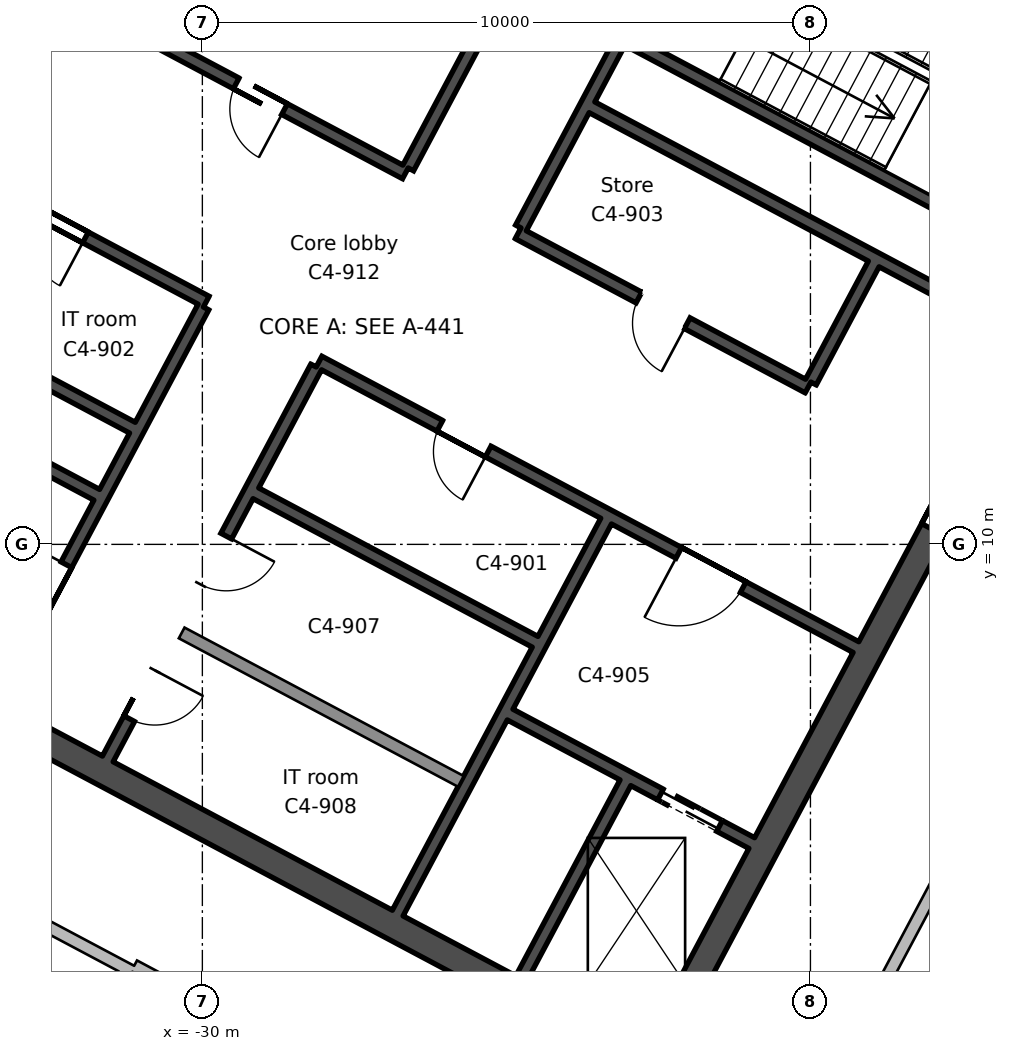
"""IFC4 building model, lengths in metres.
Left out: names, types, materials, properties, quantities, classifications, styles, units other than length and angle.
Written with IfcOpenShell. Run it as: python <this file> out.ifc"""

import sys

from ifc_helpers import new_model, si_unit, direction, frame, frame_2d, origin, place, context, subcontext, project, spatial, rectangle, extrude, element, fill, save


model = new_model("IFC4")
c1 = context("Model", 3, precision=1e-05, world=origin(), true_north=direction((0.0, 1.0)))
c2 = subcontext(c1, "Body", "Model", "MODEL_VIEW")
j1 = project(units=[si_unit("LENGTHUNIT", "METRE"), si_unit("PLANEANGLEUNIT", "RADIAN")], contexts=[c1])
p1 = place(None, origin())
s1 = spatial("IfcSite", under=j1, at=p1, CompositionType="ELEMENT")
p2 = place(p1, origin())
s2 = spatial("IfcBuilding", under=s1, at=p2, CompositionType="ELEMENT")
p3 = place(p2, frame((0.0, 0.0, 340.8)))
s3 = spatial("IfcBuildingStorey", under=s2, at=p3, CompositionType="ELEMENT", Elevation=340.8)
p4 = place(p3, frame((-13.771, 18.138, 0.0), z_axis=(0.0, 0.0, 1.0), x_axis=(-0.469467968382, -0.882949504028, 0.0)))
e1 = element("IfcWall", 1, at=p4, inside=s3, PredefinedType="SHEAR", context=c2, shape_type="SweptSolid", body=[
    extrude(rectangle(XDim=19.1, YDim=0.45, at=frame_2d((9.55, 0.0))), origin(), (0.0, 0.0, 1.0), 4.2),
])
p5 = place(p4, frame((6.55, 0.0, 0.0)))
e2 = element("IfcOpeningElement", 2, at=p5, cuts=e1, PredefinedType="OPENING", context=c2, shape_type="SweptSolid", body=[
    extrude(rectangle(XDim=2.4, YDim=2.4, at=frame_2d((1.2, 1.2))), frame((0.0, 0.235, 0.0), z_axis=(0.0, -1.0, 0.0), x_axis=(1.0, 0.0, 0.0)), (0.0, 0.0, 1.0), 0.47),
])
p6 = place(p3, frame((-32.004, 27.833, 0.0), z_axis=(0.0, 0.0, 1.0), x_axis=(-0.469467968382, -0.882949504028, 0.0)))
e3 = element("IfcWall", 3, at=p6, inside=s3, PredefinedType="SHEAR", context=c2, shape_type="SweptSolid", body=[
    extrude(rectangle(XDim=19.1, YDim=0.45, at=frame_2d((9.55, 0.0))), origin(), (0.0, 0.0, 1.0), 4.2),
])
p7 = place(p6, frame((10.15, 0.0, 0.0)))
e4 = element("IfcOpeningElement", 4, at=p7, cuts=e3, PredefinedType="OPENING", context=c2, shape_type="SweptSolid", body=[
    extrude(rectangle(XDim=2.4, YDim=2.4, at=frame_2d((1.2, 1.2))), frame((0.0, 0.235, 0.0), z_axis=(0.0, -1.0, 0.0), x_axis=(1.0, 0.0, 0.0)), (0.0, 0.0, 1.0), 0.47),
])
p8 = place(p3, frame((-14.076, 18.045, 0.0), z_axis=(0.0, 0.0, 1.0), x_axis=(-0.882947755831, 0.46947125628, 0.0)))
e5 = element("IfcWall", 5, at=p8, inside=s3, PredefinedType="SHEAR", context=c2, shape_type="SweptSolid", body=[
    extrude(rectangle(XDim=20.2, YDim=0.45, at=frame_2d((10.1, 0.0))), origin(), (0.0, 0.0, 1.0), 4.2),
])
p9 = place(p3, frame((-22.832, 1.578, 0.0), z_axis=(0.0, 0.0, 1.0), x_axis=(-0.88294509198, 0.469476266226, 0.0)))
e6 = element("IfcWall", 6, at=p9, inside=s3, PredefinedType="SHEAR", context=c2, shape_type="SweptSolid", body=[
    extrude(rectangle(XDim=20.2, YDim=0.45, at=frame_2d((10.1, 0.0))), origin(), (0.0, 0.0, 1.0), 4.2),
])
p10 = place(p3, frame((-23.043, 6.08, 0.0), z_axis=(0.0, 0.0, 1.0), x_axis=(-0.469494272526, -0.882935517501, 0.0)))
e7 = element("IfcWall", 7, at=p10, inside=s3, PredefinedType="SHEAR", context=c2, shape_type="SweptSolid", body=[
    extrude(rectangle(XDim=3.65, YDim=0.2, at=frame_2d((1.825, 0.0))), origin(), (0.0, 0.0, 1.0), 4.2),
])
p11 = place(p3, frame((-18.96, 14.611, 0.0), z_axis=(0.0, 0.0, 1.0), x_axis=(-0.4694473164, -0.882960484464, 0.0)))
e8 = element("IfcWall", 8, at=p11, inside=s3, PredefinedType="SHEAR", context=c2, shape_type="SweptSolid", body=[
    extrude(rectangle(XDim=2.2, YDim=0.2, at=frame_2d((1.1, 0.0))), origin(), (0.0, 0.0, 1.0), 4.2),
])
p12 = place(p3, frame((-23.36, 10.382, 0.0), z_axis=(0.0, 0.0, 1.0), x_axis=(-0.469480409012, -0.88294288918, 0.0)))
e9 = element("IfcWall", 9, at=p12, inside=s3, PredefinedType="SHEAR", context=c2, shape_type="SweptSolid", body=[
    extrude(rectangle(XDim=7.3, YDim=0.2, at=frame_2d((3.65, 0.0))), origin(), (0.0, 0.0, 1.0), 4.2),
])
p13 = place(p3, frame((-21.333, 21.649, 0.0), z_axis=(0.0, 0.0, 1.0), x_axis=(-0.469494272526, -0.882935517501, 0.0)))
e10 = element("IfcWall", 10, at=p13, inside=s3, PredefinedType="SHEAR", context=c2, shape_type="SweptSolid", body=[
    extrude(rectangle(XDim=7.3, YDim=0.2, at=frame_2d((3.65, 0.0))), origin(), (0.0, 0.0, 1.0), 4.2),
])
p14 = place(p13, frame((1.3, 0.0, 0.0)))
e11 = element("IfcOpeningElement", 11, at=p14, cuts=e10, PredefinedType="OPENING", context=c2, shape_type="SweptSolid", body=[
    extrude(rectangle(XDim=1.2, YDim=2.1, at=frame_2d((0.6, 1.05))), frame((0.0, 0.11, 0.0), z_axis=(0.0, -1.0, 0.0), x_axis=(1.0, 0.0, 0.0)), (0.0, 0.0, 1.0), 0.22),
])
p15 = place(p3, frame((-28.128, 12.917, 0.0), z_axis=(0.0, 0.0, 1.0), x_axis=(-0.469454336211, -0.882956752176, 0.0)))
e12 = element("IfcWall", 12, at=p15, inside=s3, PredefinedType="SHEAR", context=c2, shape_type="SweptSolid", body=[
    extrude(rectangle(XDim=7.3, YDim=0.2, at=frame_2d((3.65, 0.0))), origin(), (0.0, 0.0, 1.0), 4.2),
])
p16 = place(p15, frame((3.15, 0.0, 0.0)))
e13 = element("IfcOpeningElement", 13, at=p16, cuts=e12, PredefinedType="OPENING", context=c2, shape_type="SweptSolid", body=[
    extrude(rectangle(XDim=0.9, YDim=2.1, at=frame_2d((0.45, 1.05))), frame((0.0, 0.11, 0.0), z_axis=(0.0, -1.0, 0.0), x_axis=(1.0, 0.0, 0.0)), (0.0, 0.0, 1.0), 0.22),
])
p17 = place(p15, frame((5.65, 0.0, 0.0)))
e14 = element("IfcOpeningElement", 14, at=p17, cuts=e12, PredefinedType="OPENING", context=c2, shape_type="SweptSolid", body=[
    extrude(rectangle(XDim=0.9, YDim=2.1, at=frame_2d((0.45, 1.05))), frame((0.0, 0.11, 0.0), z_axis=(0.0, -1.0, 0.0), x_axis=(1.0, 0.0, 0.0)), (0.0, 0.0, 1.0), 0.22),
])
p18 = place(p3, frame((-23.188, 22.635, 0.0), z_axis=(0.0, 0.0, 1.0), x_axis=(-0.469454336211, -0.882956752176, 0.0)))
e15 = element("IfcWall", 15, at=p18, inside=s3, PredefinedType="SHEAR", context=c2, shape_type="SweptSolid", body=[
    extrude(rectangle(XDim=7.3, YDim=0.2, at=frame_2d((3.65, 0.0))), origin(), (0.0, 0.0, 1.0), 4.2),
])
p19 = place(p18, frame((0.45, 0.0, 0.0)))
e16 = element("IfcOpeningElement", 16, at=p19, cuts=e15, PredefinedType="OPENING", context=c2, shape_type="SweptSolid", body=[
    extrude(rectangle(XDim=0.9, YDim=2.1, at=frame_2d((0.45, 1.05))), frame((0.0, 0.11, 0.0), z_axis=(0.0, -1.0, 0.0), x_axis=(1.0, 0.0, 0.0)), (0.0, 0.0, 1.0), 0.22),
])
p20 = place(p18, frame((2.15, 0.0, 0.0)))
e17 = element("IfcOpeningElement", 17, at=p20, cuts=e15, PredefinedType="OPENING", context=c2, shape_type="SweptSolid", body=[
    extrude(rectangle(XDim=0.9, YDim=2.1, at=frame_2d((0.45, 1.05))), frame((0.0, 0.11, 0.0), z_axis=(0.0, -1.0, 0.0), x_axis=(1.0, 0.0, 0.0)), (0.0, 0.0, 1.0), 0.22),
])
p21 = place(p18, frame((3.75, 0.0, 0.0)))
e18 = element("IfcOpeningElement", 18, at=p21, cuts=e15, PredefinedType="OPENING", context=c2, shape_type="SweptSolid", body=[
    extrude(rectangle(XDim=0.9, YDim=2.1, at=frame_2d((0.45, 1.05))), frame((0.0, 0.11, 0.0), z_axis=(0.0, -1.0, 0.0), x_axis=(1.0, 0.0, 0.0)), (0.0, 0.0, 1.0), 0.22),
])
p22 = place(p3, frame((-29.982, 13.903, 0.0), z_axis=(0.0, 0.0, 1.0), x_axis=(-0.469454336211, -0.882956752176, 0.0)))
e19 = element("IfcWall", 19, at=p22, inside=s3, PredefinedType="SHEAR", context=c2, shape_type="SweptSolid", body=[
    extrude(rectangle(XDim=7.3, YDim=0.2, at=frame_2d((3.65, 0.0))), origin(), (0.0, 0.0, 1.0), 4.2),
])
p23 = place(p22, frame((4.8, 0.0, 0.0)))
e20 = element("IfcOpeningElement", 20, at=p23, cuts=e19, PredefinedType="OPENING", context=c2, shape_type="SweptSolid", body=[
    extrude(rectangle(XDim=1.2, YDim=2.1, at=frame_2d((0.6, 1.05))), frame((0.0, 0.11, 0.0), z_axis=(0.0, -1.0, 0.0), x_axis=(1.0, 0.0, 0.0)), (0.0, 0.0, 1.0), 0.22),
])
p24 = place(p3, frame((-15.942, 14.536, 0.0), z_axis=(0.0, 0.0, 1.0), x_axis=(-0.882946947542, 0.469472776449, 0.0)))
e21 = element("IfcWall", 21, at=p24, inside=s3, PredefinedType="SHEAR", context=c2, shape_type="SweptSolid", body=[
    extrude(rectangle(XDim=8.0, YDim=0.2, at=frame_2d((4.0, 0.0))), origin(), (0.0, 0.0, 1.0), 4.2),
])
p25 = place(p3, frame((-16.529, 13.432, 0.0), z_axis=(0.0, 0.0, 1.0), x_axis=(-0.88295287151, 0.469461634952, 0.0)))
e22 = element("IfcWall", 22, at=p25, inside=s3, PredefinedType="SHEAR", context=c2, shape_type="SweptSolid", body=[
    extrude(rectangle(XDim=8.0, YDim=0.2, at=frame_2d((4.0, 0.0))), origin(), (0.0, 0.0, 1.0), 4.2),
])
p26 = place(p3, frame((-20.04, 12.581, 0.0), z_axis=(0.0, 0.0, 1.0), x_axis=(-0.882942972946, 0.469480251476, 0.0)))
e23 = element("IfcWall", 23, at=p26, inside=s3, PredefinedType="SHEAR", context=c2, shape_type="SweptSolid", body=[
    extrude(rectangle(XDim=5.4, YDim=0.2, at=frame_2d((2.7, 0.0))), origin(), (0.0, 0.0, 1.0), 4.2),
])
p27 = place(p26, frame((2.25, 0.0, 0.0)))
e24 = element("IfcOpeningElement", 24, at=p27, cuts=e23, PredefinedType="OPENING", context=c2, shape_type="SweptSolid", body=[
    extrude(rectangle(XDim=0.9, YDim=2.1, at=frame_2d((0.45, 1.05))), frame((0.0, 0.11, 0.0), z_axis=(0.0, -1.0, 0.0), x_axis=(1.0, 0.0, 0.0)), (0.0, 0.0, 1.0), 0.22),
])
p28 = place(p3, frame((-26.662, 16.102, 0.0), z_axis=(0.0, 0.0, 1.0), x_axis=(-0.882940221191, 0.469485426614, 0.0)))
e25 = element("IfcWall", 25, at=p28, inside=s3, PredefinedType="SHEAR", context=c2, shape_type="SweptSolid", body=[
    extrude(rectangle(XDim=10.0, YDim=0.2, at=frame_2d((5.0, 0.0))), origin(), (0.0, 0.0, 1.0), 4.2),
])
p29 = place(p28, frame((6.3, 0.0, 0.0)))
e26 = element("IfcOpeningElement", 26, at=p29, cuts=e25, PredefinedType="OPENING", context=c2, shape_type="SweptSolid", body=[
    extrude(rectangle(XDim=1.2, YDim=2.1, at=frame_2d((0.6, 1.05))), frame((0.0, 0.11, 0.0), z_axis=(0.0, -1.0, 0.0), x_axis=(1.0, 0.0, 0.0)), (0.0, 0.0, 1.0), 0.22),
])
p30 = place(p28, frame((2.25, 0.0, 0.0)))
e27 = element("IfcOpeningElement", 27, at=p30, cuts=e25, PredefinedType="OPENING", context=c2, shape_type="SweptSolid", body=[
    extrude(rectangle(XDim=0.9, YDim=2.1, at=frame_2d((0.45, 1.05))), frame((0.0, 0.11, 0.0), z_axis=(0.0, -1.0, 0.0), x_axis=(1.0, 0.0, 0.0)), (0.0, 0.0, 1.0), 0.22),
])
p31 = place(p3, frame((-19.252, 8.311, 0.0), z_axis=(0.0, 0.0, 1.0), x_axis=(-0.882955722218, 0.469456273365, 0.0)))
e28 = element("IfcWall", 28, at=p31, inside=s3, PredefinedType="SHEAR", context=c2, shape_type="SweptSolid", body=[
    extrude(rectangle(XDim=10.0, YDim=0.2, at=frame_2d((5.0, 0.0))), origin(), (0.0, 0.0, 1.0), 4.2),
])
p32 = place(p31, frame((2.1, 0.0, 0.0)))
e29 = element("IfcOpeningElement", 29, at=p32, cuts=e28, PredefinedType="OPENING", context=c2, shape_type="SweptSolid", body=[
    extrude(rectangle(XDim=1.2, YDim=2.1, at=frame_2d((0.6, 1.05))), frame((0.0, 0.11, 0.0), z_axis=(0.0, -1.0, 0.0), x_axis=(1.0, 0.0, 0.0)), (0.0, 0.0, 1.0), 0.22),
])
p33 = place(p31, frame((6.85, 0.0, 0.0)))
e30 = element("IfcOpeningElement", 30, at=p33, cuts=e28, PredefinedType="OPENING", context=c2, shape_type="SweptSolid", body=[
    extrude(rectangle(XDim=0.9, YDim=2.1, at=frame_2d((0.45, 1.05))), frame((0.0, 0.11, 0.0), z_axis=(0.0, -1.0, 0.0), x_axis=(1.0, 0.0, 0.0)), (0.0, 0.0, 1.0), 0.22),
])
p34 = place(p3, frame((-29.935, 13.991, 0.0), z_axis=(0.0, 0.0, 1.0), x_axis=(-0.882952937579, 0.469461510692, 0.0)))
e31 = element("IfcWall", 31, at=p34, inside=s3, PredefinedType="SHEAR", context=c2, shape_type="SweptSolid", body=[
    extrude(rectangle(XDim=5.4, YDim=0.2, at=frame_2d((2.7, 0.0))), origin(), (0.0, 0.0, 1.0), 4.2),
])
p35 = place(p34, frame((2.25, 0.0, 0.0)))
e32 = element("IfcOpeningElement", 32, at=p35, cuts=e31, PredefinedType="OPENING", context=c2, shape_type="SweptSolid", body=[
    extrude(rectangle(XDim=0.9, YDim=2.1, at=frame_2d((0.45, 1.05))), frame((0.0, 0.11, 0.0), z_axis=(0.0, -1.0, 0.0), x_axis=(1.0, 0.0, 0.0)), (0.0, 0.0, 1.0), 0.22),
])
p36 = place(p3, frame((-24.528, 8.398, 0.0), z_axis=(0.0, 0.0, 1.0), x_axis=(-0.882953967957, 0.469459572775, 0.0)))
e33 = element("IfcWall", 33, at=p36, inside=s3, PredefinedType="SHEAR", context=c2, shape_type="SweptSolid", body=[
    extrude(rectangle(XDim=5.2, YDim=0.2, at=frame_2d((2.6, 0.0))), origin(), (0.0, 0.0, 1.0), 4.2),
])
p37 = place(p3, frame((-31.15, 11.919, 0.0), z_axis=(0.0, 0.0, 1.0), x_axis=(-0.882940221191, 0.469485426614, 0.0)))
e34 = element("IfcWall", 34, at=p37, inside=s3, PredefinedType="SHEAR", context=c2, shape_type="SweptSolid", body=[
    extrude(rectangle(XDim=8.0, YDim=0.2, at=frame_2d((4.0, 0.0))), origin(), (0.0, 0.0, 1.0), 4.2),
])
p38 = place(p3, frame((-20.965, 5.088, 0.0), z_axis=(0.0, 0.0, 1.0), x_axis=(-0.882925986334, 0.469512196493, 0.0)))
e35 = element("IfcWall", 35, at=p38, inside=s3, PredefinedType="SHEAR", context=c2, shape_type="SweptSolid", body=[
    extrude(rectangle(XDim=4.5, YDim=0.2, at=frame_2d((2.25, 0.0))), origin(), (0.0, 0.0, 1.0), 4.2),
])
p39 = place(p38, frame((0.6, 0.0, 0.0)))
e36 = element("IfcOpeningElement", 36, at=p39, cuts=e35, PredefinedType="OPENING", context=c2, shape_type="SweptSolid", body=[
    extrude(rectangle(XDim=1.1, YDim=2.1, at=frame_2d((0.55, 1.05))), frame((0.0, 0.11, 0.0), z_axis=(0.0, -1.0, 0.0), x_axis=(1.0, 0.0, 0.0)), (0.0, 0.0, 1.0), 0.22),
])
p40 = place(p3, frame((-31.737, 10.816, 0.0), z_axis=(0.0, 0.0, 1.0), x_axis=(-0.882940221191, 0.469485426614, 0.0)))
e37 = element("IfcWall", 37, at=p40, inside=s3, PredefinedType="SHEAR", context=c2, shape_type="SweptSolid", body=[
    extrude(rectangle(XDim=8.0, YDim=0.2, at=frame_2d((4.0, 0.0))), origin(), (0.0, 0.0, 1.0), 4.2),
])
p41 = place(p3, frame((-25.749, 6.103, 0.0), z_axis=(0.0, 0.0, 1.0), x_axis=(-0.882953967957, 0.469459572775, 0.0)))
e38 = element("IfcWall", 38, at=p41, inside=s3, PredefinedType="SOLIDWALL", context=c2, shape_type="SweptSolid", body=[
    extrude(rectangle(XDim=5.2, YDim=0.2, at=frame_2d((2.6, 0.0))), origin(), (0.0, 0.0, 1.0), 4.2),
])
p42 = place(p3, frame((-31.151, 2.972, 0.0), z_axis=(0.0, 0.0, 1.0), x_axis=(-0.882950149473, 0.469466754463, 0.0)))
e39 = element("IfcWall", 39, at=p42, inside=s3, PredefinedType="PARTITIONING", context=c2, shape_type="SweptSolid", body=[
    extrude(rectangle(XDim=7.2, YDim=0.2, at=frame_2d((3.6, 0.0))), origin(), (0.0, 0.0, 1.0), 3.8),
])
p43 = place(p42, frame((3.1, 0.0, 0.0)))
e40 = element("IfcOpeningElement", 40, at=p43, cuts=e39, PredefinedType="OPENING", context=c2, shape_type="SweptSolid", body=[
    extrude(rectangle(XDim=1.0, YDim=2.1, at=frame_2d((0.5, 1.05))), frame((0.0, 0.11, 0.0), z_axis=(0.0, -1.0, 0.0), x_axis=(1.0, 0.0, 0.0)), (0.0, 0.0, 1.0), 0.22),
])
p44 = place(p3, frame((-28.044, 1.425, 0.0), z_axis=(0.0, 0.0, 1.0), x_axis=(-0.881938187053, 0.471365075305, 0.0)))
e41 = element("IfcWall", 41, at=p44, inside=s3, PredefinedType="PARTITIONING", context=c2, shape_type="SweptSolid", body=[
    extrude(rectangle(XDim=3.49, YDim=0.2, at=frame_2d((1.745, 0.0))), origin(), (0.0, 0.0, 1.0), 3.8),
])
p45 = place(p3, frame((-10.218, 18.911, 0.0), z_axis=(0.0, 0.0, 1.0), x_axis=(-0.469468702847, -0.882949113509, 0.0)))
e42 = element("IfcWall", 42, at=p45, inside=s3, PredefinedType="PARTITIONING", context=c2, shape_type="SweptSolid", body=[
    extrude(rectangle(XDim=23.8, YDim=0.2, at=frame_2d((11.9, 0.0))), origin(), (0.0, 0.0, 1.0), 3.8),
])
p46 = place(p45, frame((11.4, 0.0, 0.0)))
e43 = element("IfcOpeningElement", 43, at=p46, cuts=e42, PredefinedType="OPENING", context=c2, shape_type="SweptSolid", body=[
    extrude(rectangle(XDim=1.0, YDim=2.1, at=frame_2d((0.5, 1.05))), frame((0.0, 0.11, 0.0), z_axis=(0.0, -1.0, 0.0), x_axis=(1.0, 0.0, 0.0)), (0.0, 0.0, 1.0), 0.22),
])
p47 = place(p32, origin())
e44 = element("IfcDoor", 44, at=p47, inside=s3, OperationType="SINGLE_SWING_RIGHT", PredefinedType="DOOR", context=c2, shape_type="SweptSolid", body=[
    extrude(rectangle(XDim=1.2, YDim=2.1, at=frame_2d((0.6, 1.05))), frame((0.0, 0.025, 0.0), z_axis=(0.0, -1.0, 0.0), x_axis=(1.0, 0.0, 0.0)), (0.0, 0.0, 1.0), 0.05),
])
fill(e29, e44)
p48 = place(p23, frame((1.2, 0.0, 0.0), z_axis=(0.0, 0.0, 1.0), x_axis=(-1.0, 0.0, 0.0)))
e45 = element("IfcDoor", 45, at=p48, inside=s3, OperationType="SINGLE_SWING_RIGHT", PredefinedType="DOOR", context=c2, shape_type="SweptSolid", body=[
    extrude(rectangle(XDim=1.2, YDim=2.1, at=frame_2d((0.6, 1.05))), frame((0.0, 0.025, 0.0), z_axis=(0.0, -1.0, 0.0), x_axis=(1.0, 0.0, 0.0)), (0.0, 0.0, 1.0), 0.05),
])
fill(e20, e45)
p49 = place(p33, origin())
e46 = element("IfcDoor", 46, at=p49, inside=s3, OperationType="SINGLE_SWING_LEFT", PredefinedType="DOOR", context=c2, shape_type="SweptSolid", body=[
    extrude(rectangle(XDim=0.9, YDim=2.1, at=frame_2d((0.45, 1.05))), frame((0.0, 0.025, 0.0), z_axis=(0.0, -1.0, 0.0), x_axis=(1.0, 0.0, 0.0)), (0.0, 0.0, 1.0), 0.05),
])
fill(e30, e46)
p50 = place(p35, origin())
e47 = element("IfcDoor", 47, at=p50, inside=s3, OperationType="SINGLE_SWING_LEFT", PredefinedType="DOOR", context=c2, shape_type="SweptSolid", body=[
    extrude(rectangle(XDim=0.9, YDim=2.1, at=frame_2d((0.45, 1.05))), frame((0.0, 0.025, 0.0), z_axis=(0.0, -1.0, 0.0), x_axis=(1.0, 0.0, 0.0)), (0.0, 0.0, 1.0), 0.05),
])
fill(e32, e47)
p51 = place(p27, origin())
e48 = element("IfcDoor", 48, at=p51, inside=s3, OperationType="SINGLE_SWING_LEFT", PredefinedType="DOOR", context=c2, shape_type="SweptSolid", body=[
    extrude(rectangle(XDim=0.9, YDim=2.1, at=frame_2d((0.45, 1.05))), frame((0.0, 0.025, 0.0), z_axis=(0.0, -1.0, 0.0), x_axis=(1.0, 0.0, 0.0)), (0.0, 0.0, 1.0), 0.05),
])
fill(e24, e48)
p52 = place(p30, origin())
e49 = element("IfcDoor", 49, at=p52, inside=s3, OperationType="SINGLE_SWING_LEFT", PredefinedType="DOOR", context=c2, shape_type="SweptSolid", body=[
    extrude(rectangle(XDim=0.9, YDim=2.1, at=frame_2d((0.45, 1.05))), frame((0.0, 0.025, 0.0), z_axis=(0.0, -1.0, 0.0), x_axis=(1.0, 0.0, 0.0)), (0.0, 0.0, 1.0), 0.05),
])
fill(e27, e49)
p53 = place(p39, origin())
e50 = element("IfcDoor", 50, at=p53, inside=s3, OperationType="DOUBLE_DOOR_SLIDING", PredefinedType="DOOR", context=c2, shape_type="SweptSolid", body=[
    extrude(rectangle(XDim=1.1, YDim=2.1, at=frame_2d((0.55, 1.05))), frame((0.0, 0.025, 0.0), z_axis=(0.0, -1.0, 0.0), x_axis=(1.0, 0.0, 0.0)), (0.0, 0.0, 1.0), 0.05),
])
fill(e36, e50)
p54 = place(p16, origin())
e51 = element("IfcDoor", 51, at=p54, inside=s3, OperationType="SINGLE_SWING_LEFT", PredefinedType="DOOR", context=c2, shape_type="SweptSolid", body=[
    extrude(rectangle(XDim=0.9, YDim=2.1, at=frame_2d((0.45, 1.05))), frame((0.0, 0.025, 0.0), z_axis=(0.0, -1.0, 0.0), x_axis=(1.0, 0.0, 0.0)), (0.0, 0.0, 1.0), 0.05),
])
fill(e13, e51)
p55 = place(p17, origin())
e52 = element("IfcDoor", 52, at=p55, inside=s3, OperationType="SINGLE_SWING_LEFT", PredefinedType="DOOR", context=c2, shape_type="SweptSolid", body=[
    extrude(rectangle(XDim=0.9, YDim=2.1, at=frame_2d((0.45, 1.05))), frame((0.0, 0.025, 0.0), z_axis=(0.0, -1.0, 0.0), x_axis=(1.0, 0.0, 0.0)), (0.0, 0.0, 1.0), 0.05),
])
fill(e14, e52)
save(model, sys.argv[1])
